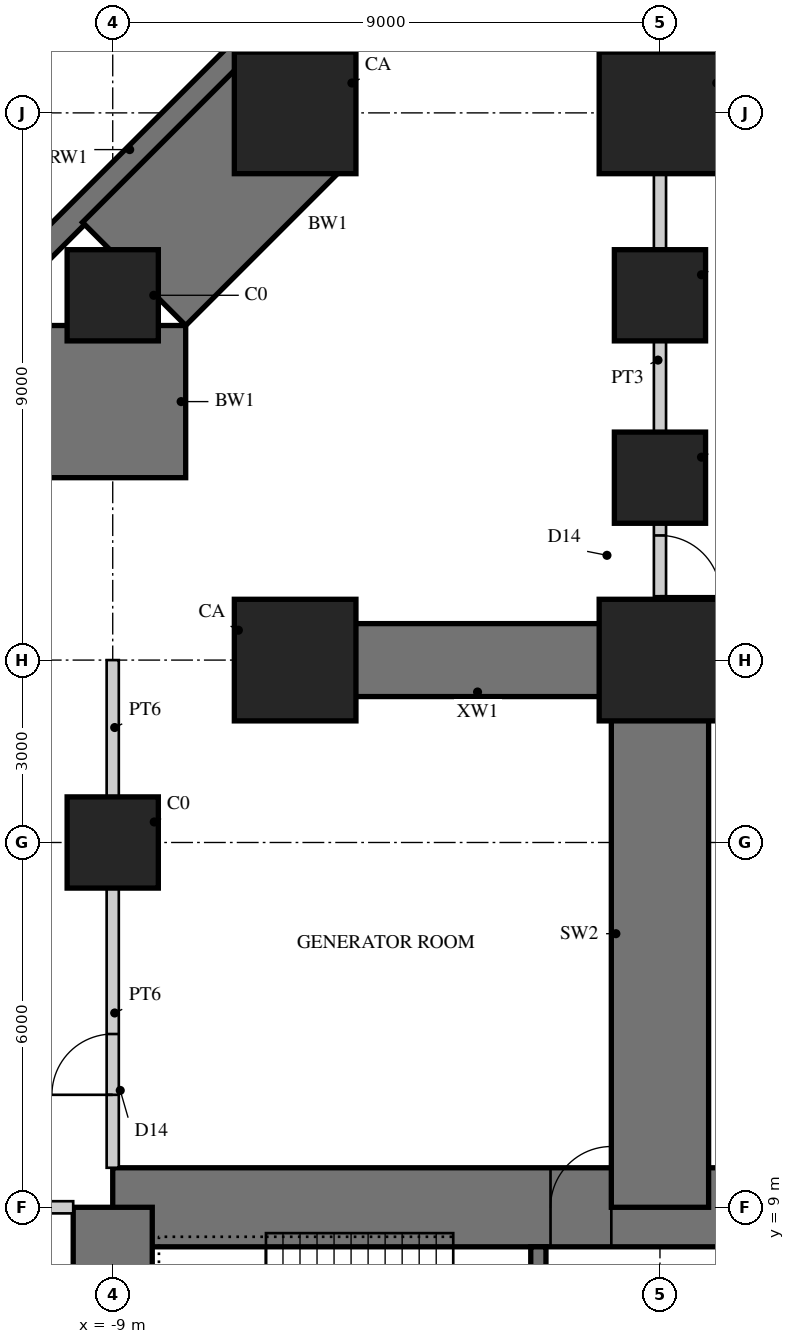
"""IFC4 building model, lengths in metres.
Left out: names, types, materials, properties, quantities, classifications, styles, units other than length and angle.
Written with IfcOpenShell. Run it as: python <this file> out.ifc"""

import sys

from ifc_helpers import new_model, si_unit, direction, frame, frame_2d, origin, origin_2d, place, context, subcontext, project, spatial, polyline, rectangle, outline, extrude, element, fill, save


model = new_model("IFC4")
c1 = context("Model", 3, precision=1e-05, world=origin(), true_north=direction((0.0, 1.0)))
c2 = subcontext(c1, "Body", "Model", "MODEL_VIEW")
j1 = project(units=[si_unit("LENGTHUNIT", "METRE"), si_unit("PLANEANGLEUNIT", "RADIAN")], contexts=[c1])
p1 = place(None, origin())
s1 = spatial("IfcSite", under=j1, at=p1, CompositionType="ELEMENT")
p2 = place(p1, origin())
s2 = spatial("IfcBuilding", under=s1, at=p2, CompositionType="ELEMENT")
p3 = place(p2, frame((0.0, 0.0, -8.0)))
s3 = spatial("IfcBuildingStorey", under=s2, at=p3, CompositionType="ELEMENT", Elevation=-8.0)
p4 = place(p3, origin())
e1 = element("IfcWall", 1, at=p4, inside=s3, PredefinedType="SOLIDWALL", context=c2, shape_type="SweptSolid", body=[
    extrude(outline(polyline([(-10.15, 24.476), (-10.55, 24.642), (-6.642, 28.55), (-6.476, 28.15), (-10.15, 24.476)])), origin(), (0.0, 0.0, 1.0), 4.0),
])
p5 = place(p3, frame((9.0, 9.0, 0.0), z_axis=(0.0, 0.0, 1.0), x_axis=(-1.0, 0.0, 0.0)))
e2 = element("IfcWall", 2, at=p5, inside=s3, PredefinedType="SHEAR", context=c2, shape_type="SweptSolid", body=[
    extrude(rectangle(XDim=18.0, YDim=1.3, at=frame_2d((9.0, 0.0))), origin(), (0.0, 0.0, 1.0), 4.0),
])
p6 = place(p5, frame((9.8, 0.0, 0.0)))
e3 = element("IfcOpeningElement", 3, at=p6, cuts=e2, PredefinedType="OPENING", context=c2, shape_type="SweptSolid", body=[
    extrude(rectangle(XDim=1.0, YDim=2.4, at=frame_2d((0.5, 1.2))), frame((0.0, 0.66, 0.0), z_axis=(0.0, -1.0, 0.0), x_axis=(1.0, 0.0, 0.0)), (0.0, 0.0, 1.0), 1.32),
])
p7 = place(p3, frame((-9.0, 9.0, 0.0), z_axis=(0.0, 0.0, 1.0), x_axis=(0.0, -1.0, 0.0)))
e4 = element("IfcWall", 4, at=p7, inside=s3, PredefinedType="SHEAR", context=c2, shape_type="SweptSolid", body=[
    extrude(rectangle(XDim=18.0, YDim=1.3, at=frame_2d((9.0, 0.0))), origin(), (0.0, 0.0, 1.0), 4.0),
])
p8 = place(p7, frame((9.8, 0.0, 0.0)))
e5 = element("IfcOpeningElement", 5, at=p8, cuts=e4, PredefinedType="OPENING", context=c2, shape_type="SweptSolid", body=[
    extrude(rectangle(XDim=1.0, YDim=2.4, at=frame_2d((0.5, 1.2))), frame((0.0, 0.66, 0.0), z_axis=(0.0, -1.0, 0.0), x_axis=(1.0, 0.0, 0.0)), (0.0, 0.0, 1.0), 1.32),
])
p9 = place(p3, frame((-2.0, 1.675, 0.0), z_axis=(0.0, 0.0, 1.0), x_axis=(0.0, 1.0, 0.0)))
e6 = element("IfcWall", 6, at=p9, inside=s3, PredefinedType="SHEAR", context=c2, shape_type="SweptSolid", body=[
    extrude(rectangle(XDim=6.675, YDim=0.25, at=frame_2d((3.337, 0.0))), origin(), (0.0, 0.0, 1.0), 4.0),
])
p10 = place(p9, frame((0.725, 0.0, 0.0)))
e7 = element("IfcOpeningElement", 7, at=p10, cuts=e6, PredefinedType="OPENING", context=c2, shape_type="SweptSolid", body=[
    extrude(rectangle(XDim=1.0, YDim=2.1, at=frame_2d((0.5, 1.05))), frame((0.0, 0.135, 0.0), z_axis=(0.0, -1.0, 0.0), x_axis=(1.0, 0.0, 0.0)), (0.0, 0.0, 1.0), 0.27),
])
p11 = place(p3, frame((0.0, 9.0, 0.0), z_axis=(0.0, 0.0, 1.0), x_axis=(0.0, 1.0, 0.0)))
e8 = element("IfcWall", 8, at=p11, inside=s3, PredefinedType="SHEAR", context=c2, shape_type="SweptSolid", body=[
    extrude(rectangle(XDim=9.0, YDim=1.6, at=frame_2d((4.5, 0.0))), origin(), (0.0, 0.0, 1.0), 4.0),
])
for number, where, z_axis, x_axis in (
    (9, (0.0, 18.0, 0.0), (0.0, 0.0, 1.0), (-1.0, 0.0, 0.0)),
    (10, (0.0, 18.0, 0.0), (0.0, 0.0, 1.0), (1.0, 0.0, 0.0)),
):
    element("IfcWall", number, at=place(p3, frame(where, z_axis=z_axis, x_axis=x_axis)), inside=s3, PredefinedType="SHEAR", context=c2, shape_type="SweptSolid", body=[
        extrude(rectangle(XDim=6.0, YDim=1.2, at=frame_2d((3.0, 0.0))), origin(), (0.0, 0.0, 1.0), 4.0),
    ])
p12 = place(p3, frame((-9.0, 21.0, 0.0), z_axis=(0.0, 0.0, 1.0), x_axis=(0.0, 1.0, 0.0)))
e11 = element("IfcWall", 11, at=p12, inside=s3, PredefinedType="SHEAR", context=c2, shape_type="SweptSolid", body=[
    extrude(rectangle(XDim=2.503, YDim=2.4, at=frame_2d((1.251, 0.0))), origin(), (0.0, 0.0, 1.0), 4.0),
])
p13 = place(p3, frame((-8.648, 24.352, 0.0), z_axis=(0.0, 0.0, 1.0), x_axis=(0.707106781187, 0.707106781187, 0.0)))
e12 = element("IfcWall", 12, at=p13, inside=s3, PredefinedType="SHEAR", context=c2, shape_type="SweptSolid", body=[
    extrude(rectangle(XDim=3.745, YDim=2.4, at=frame_2d((1.873, 0.0))), origin(), (0.0, 0.0, 1.0), 4.0),
])
for number, where, z_axis, x_axis in (
    (13, (-9.0, 15.0, 0.0), (0.0, 0.0, 1.0), (1.0, 0.0, 0.0)),
    (14, (-9.0, 24.0, 0.0), (0.0, 0.0, 1.0), (1.0, 0.0, 0.0)),
):
    element("IfcColumn", number, at=place(p3, frame(where, z_axis=z_axis, x_axis=x_axis)), inside=s3, PredefinedType="COLUMN", context=c2, shape_type="SweptSolid", body=[
        extrude(rectangle(XDim=1.5, YDim=1.5, at=origin_2d()), origin(), (0.0, 0.0, 1.0), 4.0),
    ])
for number, where, z_axis, x_axis in (
    (15, (0.0, 27.0, 0.0), (0.0, 0.0, 1.0), (1.0, 0.0, 0.0)),
    (16, (-6.0, 27.0, 0.0), (0.0, 0.0, 1.0), (1.0, 0.0, 0.0)),
    (17, (0.0, 18.0, 0.0), (0.0, 0.0, 1.0), (1.0, 0.0, 0.0)),
    (18, (-6.0, 18.0, 0.0), (0.0, 0.0, 1.0), (1.0, 0.0, 0.0)),
):
    element("IfcColumn", number, at=place(p3, frame(where, z_axis=z_axis, x_axis=x_axis)), inside=s3, PredefinedType="COLUMN", context=c2, shape_type="SweptSolid", body=[
        extrude(rectangle(XDim=2.0, YDim=2.0, at=origin_2d()), origin(), (0.0, 0.0, 1.0), 4.0),
    ])
for number, where, z_axis, x_axis in (
    (19, (0.0, 21.0, 0.0), (0.0, 0.0, 1.0), (1.0, 0.0, 0.0)),
    (20, (0.0, 24.0, 0.0), (0.0, 0.0, 1.0), (1.0, 0.0, 0.0)),
):
    element("IfcColumn", number, at=place(p3, frame(where, z_axis=z_axis, x_axis=x_axis)), inside=s3, PredefinedType="COLUMN", context=c2, shape_type="SweptSolid", body=[
        extrude(rectangle(XDim=1.5, YDim=1.5, at=origin_2d()), origin(), (0.0, 0.0, 1.0), 4.0),
    ])
p14 = place(p3, frame((-9.0, 9.65, 0.0), z_axis=(0.0, 0.0, 1.0), x_axis=(0.0, 1.0, 0.0)))
e21 = element("IfcWall", 21, at=p14, inside=s3, PredefinedType="SOLIDWALL", context=c2, shape_type="SweptSolid", body=[
    extrude(rectangle(XDim=4.6, YDim=0.2, at=frame_2d((2.3, 0.0))), origin(), (0.0, 0.0, 1.0), 2.75),
])
p15 = place(p14, frame((1.2, 0.0, 0.0)))
e22 = element("IfcOpeningElement", 22, at=p15, cuts=e21, PredefinedType="OPENING", context=c2, shape_type="SweptSolid", body=[
    extrude(rectangle(XDim=1.0, YDim=2.2, at=frame_2d((0.5, 1.1))), frame((0.0, 0.11, 0.0), z_axis=(0.0, -1.0, 0.0), x_axis=(1.0, 0.0, 0.0)), (0.0, 0.0, 1.0), 0.22),
])
p16 = place(p3, frame((-9.0, 15.75, 0.0), z_axis=(0.0, 0.0, 1.0), x_axis=(0.0, 1.0, 0.0)))
e23 = element("IfcWall", 23, at=p16, inside=s3, PredefinedType="SOLIDWALL", context=c2, shape_type="SweptSolid", body=[
    extrude(rectangle(XDim=2.25, YDim=0.2, at=frame_2d((1.125, 0.0))), origin(), (0.0, 0.0, 1.0), 2.75),
])
p17 = place(p3, frame((-14.25, 9.0, 0.0), z_axis=(0.0, 0.0, 1.0), x_axis=(1.0, 0.0, 0.0)))
e24 = element("IfcWall", 24, at=p17, inside=s3, PredefinedType="SOLIDWALL", context=c2, shape_type="SweptSolid", body=[
    extrude(rectangle(XDim=4.6, YDim=0.2, at=frame_2d((2.3, 0.0))), origin(), (0.0, 0.0, 1.0), 2.75),
])
p18 = place(p3, frame((0.0, 18.0, 0.0), z_axis=(0.0, 0.0, 1.0), x_axis=(0.0, 1.0, 0.0)))
e25 = element("IfcWall", 25, at=p18, inside=s3, PredefinedType="SOLIDWALL", context=c2, shape_type="SweptSolid", body=[
    extrude(rectangle(XDim=3.0, YDim=0.2, at=frame_2d((1.5, 0.0))), origin(), (0.0, 0.0, 1.0), 3.75),
])
p19 = place(p18, frame((1.05, 0.0, 0.0)))
e26 = element("IfcOpeningElement", 26, at=p19, cuts=e25, PredefinedType="OPENING", context=c2, shape_type="SweptSolid", body=[
    extrude(rectangle(XDim=1.0, YDim=2.2, at=frame_2d((0.5, 1.1))), frame((0.0, 0.11, 0.0), z_axis=(0.0, -1.0, 0.0), x_axis=(1.0, 0.0, 0.0)), (0.0, 0.0, 1.0), 0.22),
])
p20 = place(p3, frame((0.0, 21.0, 0.0), z_axis=(0.0, 0.0, 1.0), x_axis=(0.0, 1.0, 0.0)))
e27 = element("IfcWall", 27, at=p20, inside=s3, PredefinedType="SOLIDWALL", context=c2, shape_type="SweptSolid", body=[
    extrude(rectangle(XDim=6.0, YDim=0.2, at=frame_2d((3.0, 0.0))), origin(), (0.0, 0.0, 1.0), 2.75),
])
p21 = place(p15, origin())
e28 = element("IfcDoor", 28, at=p21, inside=s3, OperationType="SINGLE_SWING_LEFT", PredefinedType="DOOR", context=c2, shape_type="SweptSolid", body=[
    extrude(rectangle(XDim=1.0, YDim=2.2, at=frame_2d((0.5, 1.1))), frame((0.0, 0.025, 0.0), z_axis=(0.0, -1.0, 0.0), x_axis=(1.0, 0.0, 0.0)), (0.0, 0.0, 1.0), 0.05),
])
fill(e22, e28)
p22 = place(p19, frame((1.0, 0.0, 0.0), z_axis=(0.0, 0.0, 1.0), x_axis=(-1.0, 0.0, 0.0)))
e29 = element("IfcDoor", 29, at=p22, inside=s3, OperationType="SINGLE_SWING_RIGHT", PredefinedType="DOOR", context=c2, shape_type="SweptSolid", body=[
    extrude(rectangle(XDim=1.0, YDim=2.2, at=frame_2d((0.5, 1.1))), frame((0.0, 0.025, 0.0), z_axis=(0.0, -1.0, 0.0), x_axis=(1.0, 0.0, 0.0)), (0.0, 0.0, 1.0), 0.05),
])
fill(e26, e29)
p23 = place(p6, frame((1.0, 0.0, 0.0), z_axis=(0.0, 0.0, 1.0), x_axis=(-1.0, 0.0, 0.0)))
e30 = element("IfcDoor", 30, at=p23, inside=s3, OperationType="SINGLE_SWING_RIGHT", PredefinedType="DOOR", context=c2, shape_type="SweptSolid", body=[
    extrude(rectangle(XDim=1.0, YDim=2.4, at=frame_2d((0.5, 1.2))), frame((0.0, -0.005, 0.0), z_axis=(0.0, -1.0, 0.0), x_axis=(1.0, 0.0, 0.0)), (0.0, 0.0, 1.0), 0.05),
])
fill(e3, e30)
save(model, sys.argv[1])
